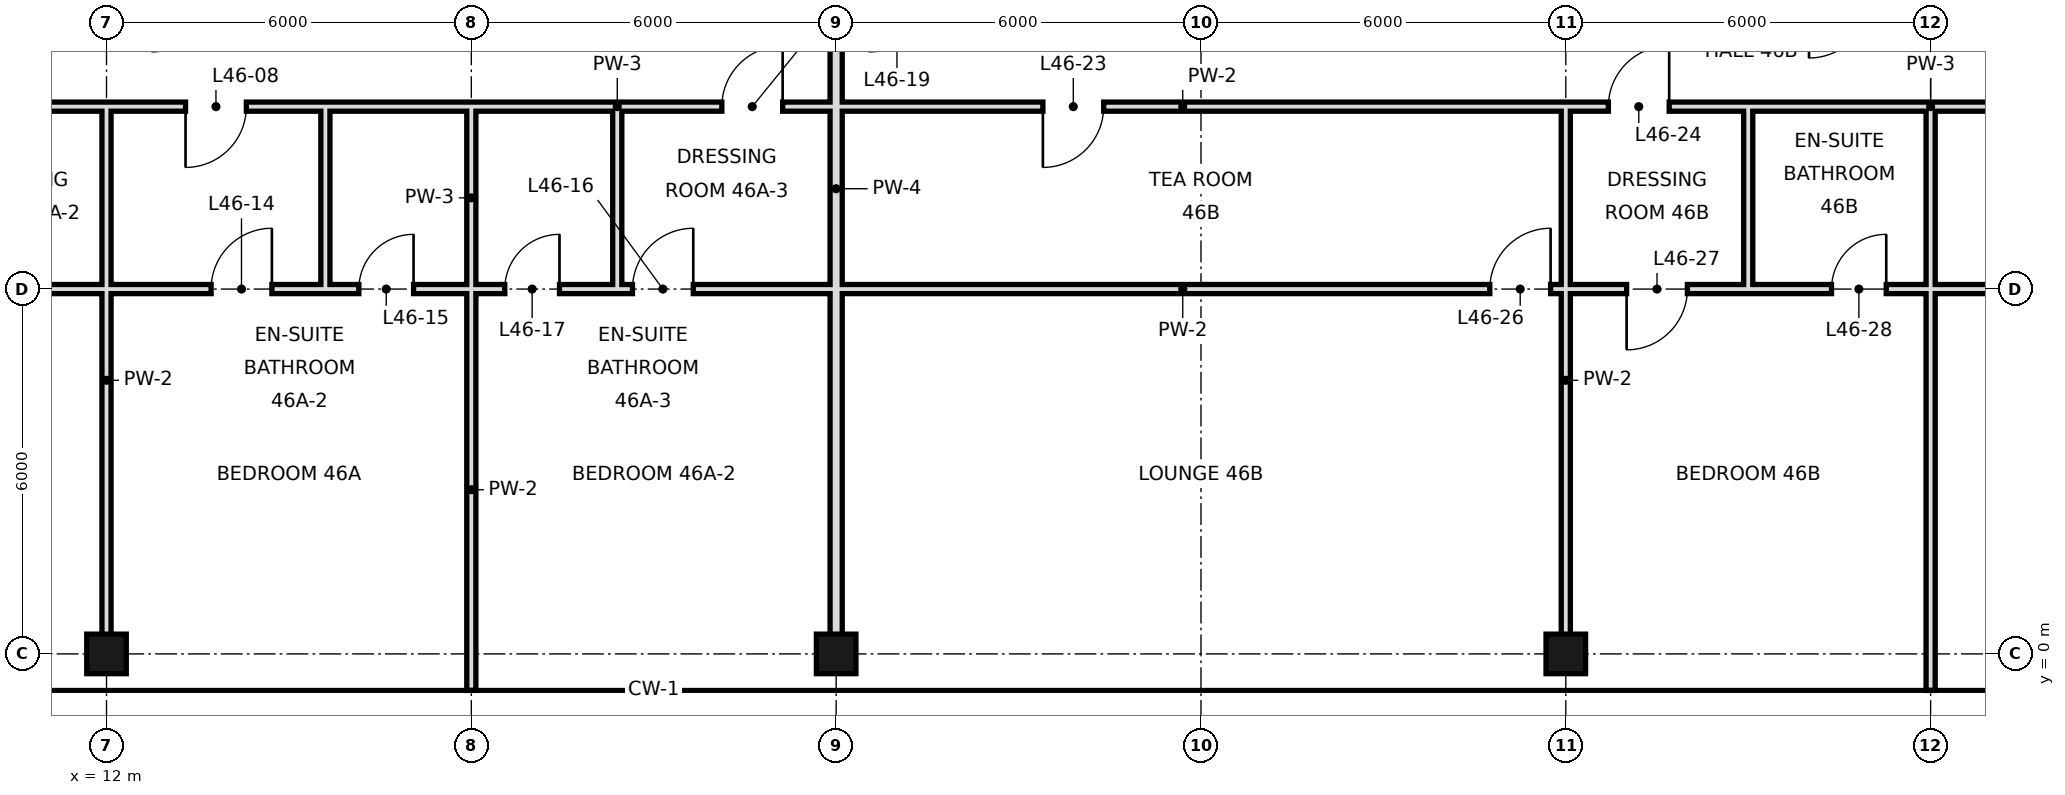
"""IFC4 building model, lengths in metres.
Left out: names, types, materials, properties, quantities, classifications, styles, units other than length and angle.
Written with IfcOpenShell. Run it as: python <this file> out.ifc"""

import sys

from ifc_helpers import new_model, si_unit, direction, frame, frame_2d, origin, origin_2d, place, context, subcontext, project, spatial, rectangle, hollow_rectangle, extrude, element, fill, save


model = new_model("IFC4")
c1 = context("Model", 3, precision=1e-05, world=origin(), true_north=direction((0.0, 1.0)))
c2 = subcontext(c1, "Body", "Model", "MODEL_VIEW")
j1 = project(units=[si_unit("LENGTHUNIT", "METRE"), si_unit("PLANEANGLEUNIT", "RADIAN")], contexts=[c1])
p1 = place(None, origin())
s1 = spatial("IfcSite", under=j1, at=p1, CompositionType="ELEMENT")
p2 = place(p1, origin())
s2 = spatial("IfcBuilding", under=s1, at=p2, CompositionType="ELEMENT")
p3 = place(p2, frame((0.0, 0.0, 199.2)))
s3 = spatial("IfcBuildingStorey", under=s2, at=p3, CompositionType="ELEMENT", Elevation=199.2)
for number, where, z_axis, x_axis in (
    (1, (12.0, 0.0, 0.0), (0.0, 0.0, 1.0), (1.0, 0.0, 0.0)),
    (2, (24.0, 0.0, 0.0), (0.0, 0.0, 1.0), (1.0, 0.0, 0.0)),
    (3, (36.0, 0.0, 0.0), (0.0, 0.0, 1.0), (1.0, 0.0, 0.0)),
):
    element("IfcColumn", number, at=place(p3, frame(where, z_axis=z_axis, x_axis=x_axis)), inside=s3, PredefinedType="COLUMN", context=c2, shape_type="SweptSolid", body=[
        extrude(hollow_rectangle(XDim=0.65, YDim=0.65, WallThickness=0.032, at=origin_2d()), origin(), (0.0, 0.0, 1.0), 3.6),
    ])
p4 = place(p3, frame((12.0, 0.0, 0.0), z_axis=(0.0, 0.0, 1.0), x_axis=(0.0, 1.0, 0.0)))
e4 = element("IfcWall", 4, at=p4, inside=s3, PredefinedType="PARTITIONING", context=c2, shape_type="SweptSolid", body=[
    extrude(rectangle(XDim=9.0, YDim=0.15, at=frame_2d((4.5, 0.0))), origin(), (0.0, 0.0, 1.0), 2.72),
])
p5 = place(p3, frame((15.6, 6.0, 0.0), z_axis=(0.0, 0.0, 1.0), x_axis=(0.0, 1.0, 0.0)))
e5 = element("IfcWall", 5, at=p5, inside=s3, PredefinedType="PARTITIONING", context=c2, shape_type="SweptSolid", body=[
    extrude(rectangle(XDim=3.0, YDim=0.15, at=frame_2d((1.5, 0.0))), origin(), (0.0, 0.0, 1.0), 3.42),
])
p6 = place(p3, frame((18.0, -0.6, 0.0), z_axis=(0.0, 0.0, 1.0), x_axis=(0.0, 1.0, 0.0)))
e6 = element("IfcWall", 6, at=p6, inside=s3, PredefinedType="PARTITIONING", context=c2, shape_type="SweptSolid", body=[
    extrude(rectangle(XDim=6.6, YDim=0.15, at=frame_2d((3.3, 0.0))), origin(), (0.0, 0.0, 1.0), 2.72),
])
p7 = place(p3, frame((18.0, 6.0, 0.0), z_axis=(0.0, 0.0, 1.0), x_axis=(0.0, 1.0, 0.0)))
e7 = element("IfcWall", 7, at=p7, inside=s3, PredefinedType="PARTITIONING", context=c2, shape_type="SweptSolid", body=[
    extrude(rectangle(XDim=3.0, YDim=0.15, at=frame_2d((1.5, 0.0))), origin(), (0.0, 0.0, 1.0), 2.72),
])
p8 = place(p3, frame((20.4, 6.0, 0.0), z_axis=(0.0, 0.0, 1.0), x_axis=(0.0, 1.0, 0.0)))
e8 = element("IfcWall", 8, at=p8, inside=s3, PredefinedType="PARTITIONING", context=c2, shape_type="SweptSolid", body=[
    extrude(rectangle(XDim=3.0, YDim=0.15, at=frame_2d((1.5, 0.0))), origin(), (0.0, 0.0, 1.0), 3.42),
])
p9 = place(p3, frame((24.0, 0.0, 0.0), z_axis=(0.0, 0.0, 1.0), x_axis=(0.0, 1.0, 0.0)))
e9 = element("IfcWall", 9, at=p9, inside=s3, PredefinedType="SOLIDWALL", context=c2, shape_type="SweptSolid", body=[
    extrude(rectangle(XDim=15.3, YDim=0.2, at=frame_2d((7.65, 0.0))), origin(), (0.0, 0.0, 1.0), 2.72),
])
p10 = place(p3, frame((36.0, 0.0, 0.0), z_axis=(0.0, 0.0, 1.0), x_axis=(0.0, 1.0, 0.0)))
e10 = element("IfcWall", 10, at=p10, inside=s3, PredefinedType="PARTITIONING", context=c2, shape_type="SweptSolid", body=[
    extrude(rectangle(XDim=9.0, YDim=0.15, at=frame_2d((4.5, 0.0))), origin(), (0.0, 0.0, 1.0), 2.72),
])
p11 = place(p3, frame((39.0, 6.0, 0.0), z_axis=(0.0, 0.0, 1.0), x_axis=(0.0, 1.0, 0.0)))
e11 = element("IfcWall", 11, at=p11, inside=s3, PredefinedType="PARTITIONING", context=c2, shape_type="SweptSolid", body=[
    extrude(rectangle(XDim=3.0, YDim=0.15, at=frame_2d((1.5, 0.0))), origin(), (0.0, 0.0, 1.0), 3.42),
])
p12 = place(p3, frame((42.0, -0.6, 0.0), z_axis=(0.0, 0.0, 1.0), x_axis=(0.0, 1.0, 0.0)))
e12 = element("IfcWall", 12, at=p12, inside=s3, PredefinedType="PARTITIONING", context=c2, shape_type="SweptSolid", body=[
    extrude(rectangle(XDim=6.6, YDim=0.15, at=frame_2d((3.3, 0.0))), origin(), (0.0, 0.0, 1.0), 2.72),
])
p13 = place(p3, frame((42.0, 6.0, 0.0), z_axis=(0.0, 0.0, 1.0), x_axis=(0.0, 1.0, 0.0)))
e13 = element("IfcWall", 13, at=p13, inside=s3, PredefinedType="PARTITIONING", context=c2, shape_type="SweptSolid", body=[
    extrude(rectangle(XDim=3.0, YDim=0.15, at=frame_2d((1.5, 0.0))), origin(), (0.0, 0.0, 1.0), 2.72),
])
p14 = place(p3, frame((-3.6, 6.0, 0.0), z_axis=(0.0, 0.0, 1.0), x_axis=(1.0, 0.0, 0.0)))
e14 = element("IfcWall", 14, at=p14, inside=s3, PredefinedType="PARTITIONING", context=c2, shape_type="SweptSolid", body=[
    extrude(rectangle(XDim=19.2, YDim=0.15, at=frame_2d((9.6, 0.0))), origin(), (0.0, 0.0, 1.0), 2.72),
])
p15 = place(p14, frame((1.3, 0.0, 0.0)))
e15 = element("IfcOpeningElement", 15, at=p15, cuts=e14, PredefinedType="OPENING", context=c2, shape_type="SweptSolid", body=[
    extrude(rectangle(XDim=1.0, YDim=2.4, at=frame_2d((0.5, 1.2))), frame((0.0, 0.085, 0.0), z_axis=(0.0, -1.0, 0.0), x_axis=(1.0, 0.0, 0.0)), (0.0, 0.0, 1.0), 0.17),
])
p16 = place(p14, frame((10.64, 0.0, 0.0)))
e16 = element("IfcOpeningElement", 16, at=p16, cuts=e14, PredefinedType="OPENING", context=c2, shape_type="SweptSolid", body=[
    extrude(rectangle(XDim=1.8, YDim=2.4, at=frame_2d((0.9, 1.2))), frame((0.0, 0.085, 0.0), z_axis=(0.0, -1.0, 0.0), x_axis=(1.0, 0.0, 0.0)), (0.0, 0.0, 1.0), 0.17),
])
p17 = place(p14, frame((17.32, 0.0, 0.0)))
e17 = element("IfcOpeningElement", 17, at=p17, cuts=e14, PredefinedType="OPENING", context=c2, shape_type="SweptSolid", body=[
    extrude(rectangle(XDim=1.0, YDim=2.4, at=frame_2d((0.5, 1.2))), frame((0.0, 0.085, 0.0), z_axis=(0.0, -1.0, 0.0), x_axis=(1.0, 0.0, 0.0)), (0.0, 0.0, 1.0), 0.17),
])
p18 = place(p3, frame((20.4, 6.0, 0.0), z_axis=(0.0, 0.0, 1.0), x_axis=(1.0, 0.0, 0.0)))
e18 = element("IfcWall", 18, at=p18, inside=s3, PredefinedType="PARTITIONING", context=c2, shape_type="SweptSolid", body=[
    extrude(rectangle(XDim=18.6, YDim=0.15, at=frame_2d((9.3, 0.0))), origin(), (0.0, 0.0, 1.0), 2.97),
])
p19 = place(p18, frame((0.25, 0.0, 0.0)))
e19 = element("IfcOpeningElement", 19, at=p19, cuts=e18, PredefinedType="OPENING", context=c2, shape_type="SweptSolid", body=[
    extrude(rectangle(XDim=1.0, YDim=2.4, at=frame_2d((0.5, 1.2))), frame((0.0, 0.085, 0.0), z_axis=(0.0, -1.0, 0.0), x_axis=(1.0, 0.0, 0.0)), (0.0, 0.0, 1.0), 0.17),
])
p20 = place(p18, frame((14.35, 0.0, 0.0)))
e20 = element("IfcOpeningElement", 20, at=p20, cuts=e18, PredefinedType="OPENING", context=c2, shape_type="SweptSolid", body=[
    extrude(rectangle(XDim=1.0, YDim=2.4, at=frame_2d((0.5, 1.2))), frame((0.0, 0.085, 0.0), z_axis=(0.0, -1.0, 0.0), x_axis=(1.0, 0.0, 0.0)), (0.0, 0.0, 1.0), 0.17),
])
p21 = place(p18, frame((16.6, 0.0, 0.0)))
e21 = element("IfcOpeningElement", 21, at=p21, cuts=e18, PredefinedType="OPENING", context=c2, shape_type="SweptSolid", body=[
    extrude(rectangle(XDim=1.0, YDim=2.4, at=frame_2d((0.5, 1.2))), frame((0.0, 0.085, 0.0), z_axis=(0.0, -1.0, 0.0), x_axis=(1.0, 0.0, 0.0)), (0.0, 0.0, 1.0), 0.17),
])
p22 = place(p3, frame((42.0, 6.0, 0.0), z_axis=(0.0, 0.0, 1.0), x_axis=(1.0, 0.0, 0.0)))
e22 = element("IfcWall", 22, at=p22, inside=s3, PredefinedType="PARTITIONING", context=c2, shape_type="SweptSolid", body=[
    extrude(rectangle(XDim=12.0, YDim=0.15, at=frame_2d((6.0, 0.0))), origin(), (0.0, 0.0, 1.0), 2.97),
])
p23 = place(p22, frame((5.1, 0.0, 0.0)))
e23 = element("IfcOpeningElement", 23, at=p23, cuts=e22, PredefinedType="OPENING", context=c2, shape_type="SweptSolid", body=[
    extrude(rectangle(XDim=1.8, YDim=2.4, at=frame_2d((0.9, 1.2))), frame((0.0, 0.085, 0.0), z_axis=(0.0, -1.0, 0.0), x_axis=(1.0, 0.0, 0.0)), (0.0, 0.0, 1.0), 0.17),
])
p24 = place(p3, frame((15.6, 6.0, 0.0), z_axis=(0.0, 0.0, 1.0), x_axis=(1.0, 0.0, 0.0)))
e24 = element("IfcWall", 24, at=p24, inside=s3, PredefinedType="PARTITIONING", context=c2, shape_type="SweptSolid", body=[
    extrude(rectangle(XDim=4.8, YDim=0.15, at=frame_2d((2.4, 0.0))), origin(), (0.0, 0.0, 1.0), 2.97),
])
p25 = place(p24, frame((0.55, 0.0, 0.0)))
e25 = element("IfcOpeningElement", 25, at=p25, cuts=e24, PredefinedType="OPENING", context=c2, shape_type="SweptSolid", body=[
    extrude(rectangle(XDim=0.9, YDim=2.4, at=frame_2d((0.45, 1.2))), frame((0.0, 0.085, 0.0), z_axis=(0.0, -1.0, 0.0), x_axis=(1.0, 0.0, 0.0)), (0.0, 0.0, 1.0), 0.17),
])
p26 = place(p24, frame((2.95, 0.0, 0.0)))
e26 = element("IfcOpeningElement", 26, at=p26, cuts=e24, PredefinedType="OPENING", context=c2, shape_type="SweptSolid", body=[
    extrude(rectangle(XDim=0.9, YDim=2.4, at=frame_2d((0.45, 1.2))), frame((0.0, 0.085, 0.0), z_axis=(0.0, -1.0, 0.0), x_axis=(1.0, 0.0, 0.0)), (0.0, 0.0, 1.0), 0.17),
])
p27 = place(p3, frame((39.0, 6.0, 0.0), z_axis=(0.0, 0.0, 1.0), x_axis=(1.0, 0.0, 0.0)))
e27 = element("IfcWall", 27, at=p27, inside=s3, PredefinedType="PARTITIONING", context=c2, shape_type="SweptSolid", body=[
    extrude(rectangle(XDim=3.0, YDim=0.15, at=frame_2d((1.5, 0.0))), origin(), (0.0, 0.0, 1.0), 2.97),
])
p28 = place(p27, frame((1.37, 0.0, 0.0)))
e28 = element("IfcOpeningElement", 28, at=p28, cuts=e27, PredefinedType="OPENING", context=c2, shape_type="SweptSolid", body=[
    extrude(rectangle(XDim=0.9, YDim=2.4, at=frame_2d((0.45, 1.2))), frame((0.0, 0.085, 0.0), z_axis=(0.0, -1.0, 0.0), x_axis=(1.0, 0.0, 0.0)), (0.0, 0.0, 1.0), 0.17),
])
p29 = place(p3, frame((-3.6, 9.0, 0.0), z_axis=(0.0, 0.0, 1.0), x_axis=(1.0, 0.0, 0.0)))
e29 = element("IfcWall", 29, at=p29, inside=s3, PredefinedType="PARTITIONING", context=c2, shape_type="SweptSolid", body=[
    extrude(rectangle(XDim=19.2, YDim=0.15, at=frame_2d((9.6, 0.0))), origin(), (0.0, 0.0, 1.0), 3.42),
])
p30 = place(p29, frame((0.88, 0.0, 0.0)))
e30 = element("IfcOpeningElement", 30, at=p30, cuts=e29, PredefinedType="OPENING", context=c2, shape_type="SweptSolid", body=[
    extrude(rectangle(XDim=1.0, YDim=2.4, at=frame_2d((0.5, 1.2))), frame((0.0, 0.085, 0.0), z_axis=(0.0, -1.0, 0.0), x_axis=(1.0, 0.0, 0.0)), (0.0, 0.0, 1.0), 0.17),
])
p31 = place(p29, frame((8.7, 0.0, 0.0)))
e31 = element("IfcOpeningElement", 31, at=p31, cuts=e29, PredefinedType="OPENING", context=c2, shape_type="SweptSolid", body=[
    extrude(rectangle(XDim=1.8, YDim=2.4, at=frame_2d((0.9, 1.2))), frame((0.0, 0.085, 0.0), z_axis=(0.0, -1.0, 0.0), x_axis=(1.0, 0.0, 0.0)), (0.0, 0.0, 1.0), 0.17),
])
p32 = place(p29, frame((16.9, 0.0, 0.0)))
e32 = element("IfcOpeningElement", 32, at=p32, cuts=e29, PredefinedType="OPENING", context=c2, shape_type="SweptSolid", body=[
    extrude(rectangle(XDim=1.0, YDim=2.4, at=frame_2d((0.5, 1.2))), frame((0.0, 0.085, 0.0), z_axis=(0.0, -1.0, 0.0), x_axis=(1.0, 0.0, 0.0)), (0.0, 0.0, 1.0), 0.17),
])
p33 = place(p3, frame((20.4, 9.0, 0.0), z_axis=(0.0, 0.0, 1.0), x_axis=(1.0, 0.0, 0.0)))
e33 = element("IfcWall", 33, at=p33, inside=s3, PredefinedType="PARTITIONING", context=c2, shape_type="SweptSolid", body=[
    extrude(rectangle(XDim=18.6, YDim=0.15, at=frame_2d((9.3, 0.0))), origin(), (0.0, 0.0, 1.0), 3.42),
])
p34 = place(p33, frame((1.72, 0.0, 0.0)))
e34 = element("IfcOpeningElement", 34, at=p34, cuts=e33, PredefinedType="OPENING", context=c2, shape_type="SweptSolid", body=[
    extrude(rectangle(XDim=1.0, YDim=2.4, at=frame_2d((0.5, 1.2))), frame((0.0, 0.085, 0.0), z_axis=(0.0, -1.0, 0.0), x_axis=(1.0, 0.0, 0.0)), (0.0, 0.0, 1.0), 0.17),
])
p35 = place(p33, frame((7.0, 0.0, 0.0)))
e35 = element("IfcOpeningElement", 35, at=p35, cuts=e33, PredefinedType="OPENING", context=c2, shape_type="SweptSolid", body=[
    extrude(rectangle(XDim=1.0, YDim=2.4, at=frame_2d((0.5, 1.2))), frame((0.0, 0.085, 0.0), z_axis=(0.0, -1.0, 0.0), x_axis=(1.0, 0.0, 0.0)), (0.0, 0.0, 1.0), 0.17),
])
p36 = place(p33, frame((16.3, 0.0, 0.0)))
e36 = element("IfcOpeningElement", 36, at=p36, cuts=e33, PredefinedType="OPENING", context=c2, shape_type="SweptSolid", body=[
    extrude(rectangle(XDim=1.0, YDim=2.4, at=frame_2d((0.5, 1.2))), frame((0.0, 0.085, 0.0), z_axis=(0.0, -1.0, 0.0), x_axis=(1.0, 0.0, 0.0)), (0.0, 0.0, 1.0), 0.17),
])
p37 = place(p3, frame((42.0, 9.0, 0.0), z_axis=(0.0, 0.0, 1.0), x_axis=(1.0, 0.0, 0.0)))
e37 = element("IfcWall", 37, at=p37, inside=s3, PredefinedType="PARTITIONING", context=c2, shape_type="SweptSolid", body=[
    extrude(rectangle(XDim=12.6, YDim=0.15, at=frame_2d((6.3, 0.0))), origin(), (0.0, 0.0, 1.0), 3.42),
])
p38 = place(p37, frame((5.1, 0.0, 0.0)))
e38 = element("IfcOpeningElement", 38, at=p38, cuts=e37, PredefinedType="OPENING", context=c2, shape_type="SweptSolid", body=[
    extrude(rectangle(XDim=1.8, YDim=2.4, at=frame_2d((0.9, 1.2))), frame((0.0, 0.085, 0.0), z_axis=(0.0, -1.0, 0.0), x_axis=(1.0, 0.0, 0.0)), (0.0, 0.0, 1.0), 0.17),
])
p39 = place(p3, frame((15.6, 9.0, 0.0), z_axis=(0.0, 0.0, 1.0), x_axis=(1.0, 0.0, 0.0)))
e39 = element("IfcWall", 39, at=p39, inside=s3, PredefinedType="PARTITIONING", context=c2, shape_type="SweptSolid", body=[
    extrude(rectangle(XDim=4.8, YDim=0.15, at=frame_2d((2.4, 0.0))), origin(), (0.0, 0.0, 1.0), 3.42),
])
p40 = place(p3, frame((39.0, 9.0, 0.0), z_axis=(0.0, 0.0, 1.0), x_axis=(1.0, 0.0, 0.0)))
e40 = element("IfcWall", 40, at=p40, inside=s3, PredefinedType="PARTITIONING", context=c2, shape_type="SweptSolid", body=[
    extrude(rectangle(XDim=3.0, YDim=0.15, at=frame_2d((1.5, 0.0))), origin(), (0.0, 0.0, 1.0), 3.42),
])
p41 = place(p32, frame((1.0, 0.0, 0.0), z_axis=(0.0, 0.0, 1.0), x_axis=(-1.0, 0.0, 0.0)))
e41 = element("IfcDoor", 41, at=p41, inside=s3, OperationType="SINGLE_SWING_RIGHT", PredefinedType="DOOR", context=c2, shape_type="SweptSolid", body=[
    extrude(rectangle(XDim=1.0, YDim=2.4, at=frame_2d((0.5, 1.2))), frame((0.0, 0.025, 0.0), z_axis=(0.0, -1.0, 0.0), x_axis=(1.0, 0.0, 0.0)), (0.0, 0.0, 1.0), 0.05),
])
fill(e32, e41)
p42 = place(p34, frame((1.0, 0.0, 0.0), z_axis=(0.0, 0.0, 1.0), x_axis=(-1.0, 0.0, 0.0)))
e42 = element("IfcDoor", 42, at=p42, inside=s3, OperationType="SINGLE_SWING_LEFT", PredefinedType="DOOR", context=c2, shape_type="SweptSolid", body=[
    extrude(rectangle(XDim=1.0, YDim=2.4, at=frame_2d((0.5, 1.2))), frame((0.0, 0.025, 0.0), z_axis=(0.0, -1.0, 0.0), x_axis=(1.0, 0.0, 0.0)), (0.0, 0.0, 1.0), 0.05),
])
fill(e34, e42)
p43 = place(p17, frame((1.0, 0.0, 0.0), z_axis=(0.0, 0.0, 1.0), x_axis=(-1.0, 0.0, 0.0)))
e43 = element("IfcDoor", 43, at=p43, inside=s3, OperationType="SINGLE_SWING_LEFT", PredefinedType="DOOR", context=c2, shape_type="SweptSolid", body=[
    extrude(rectangle(XDim=1.0, YDim=2.4, at=frame_2d((0.5, 1.2))), frame((0.0, 0.025, 0.0), z_axis=(0.0, -1.0, 0.0), x_axis=(1.0, 0.0, 0.0)), (0.0, 0.0, 1.0), 0.05),
])
fill(e17, e43)
p44 = place(p25, frame((0.9, 0.0, 0.0), z_axis=(0.0, 0.0, 1.0), x_axis=(-1.0, 0.0, 0.0)))
e44 = element("IfcDoor", 44, at=p44, inside=s3, OperationType="SINGLE_SWING_LEFT", PredefinedType="DOOR", context=c2, shape_type="SweptSolid", body=[
    extrude(rectangle(XDim=0.9, YDim=2.4, at=frame_2d((0.45, 1.2))), frame((0.0, 0.025, 0.0), z_axis=(0.0, -1.0, 0.0), x_axis=(1.0, 0.0, 0.0)), (0.0, 0.0, 1.0), 0.05),
])
fill(e25, e44)
p45 = place(p19, frame((1.0, 0.0, 0.0), z_axis=(0.0, 0.0, 1.0), x_axis=(-1.0, 0.0, 0.0)))
e45 = element("IfcDoor", 45, at=p45, inside=s3, OperationType="SINGLE_SWING_LEFT", PredefinedType="DOOR", context=c2, shape_type="SweptSolid", body=[
    extrude(rectangle(XDim=1.0, YDim=2.4, at=frame_2d((0.5, 1.2))), frame((0.0, 0.025, 0.0), z_axis=(0.0, -1.0, 0.0), x_axis=(1.0, 0.0, 0.0)), (0.0, 0.0, 1.0), 0.05),
])
fill(e19, e45)
p46 = place(p26, frame((0.9, 0.0, 0.0), z_axis=(0.0, 0.0, 1.0), x_axis=(-1.0, 0.0, 0.0)))
e46 = element("IfcDoor", 46, at=p46, inside=s3, OperationType="SINGLE_SWING_LEFT", PredefinedType="DOOR", context=c2, shape_type="SweptSolid", body=[
    extrude(rectangle(XDim=0.9, YDim=2.4, at=frame_2d((0.45, 1.2))), frame((0.0, 0.025, 0.0), z_axis=(0.0, -1.0, 0.0), x_axis=(1.0, 0.0, 0.0)), (0.0, 0.0, 1.0), 0.05),
])
fill(e26, e46)
p47 = place(p35, frame((1.0, 0.0, 0.0), z_axis=(0.0, 0.0, 1.0), x_axis=(-1.0, 0.0, 0.0)))
e47 = element("IfcDoor", 47, at=p47, inside=s3, OperationType="SINGLE_SWING_RIGHT", PredefinedType="DOOR", context=c2, shape_type="SweptSolid", body=[
    extrude(rectangle(XDim=1.0, YDim=2.4, at=frame_2d((0.5, 1.2))), frame((0.0, 0.025, 0.0), z_axis=(0.0, -1.0, 0.0), x_axis=(1.0, 0.0, 0.0)), (0.0, 0.0, 1.0), 0.05),
])
fill(e35, e47)
p48 = place(p36, frame((1.0, 0.0, 0.0), z_axis=(0.0, 0.0, 1.0), x_axis=(-1.0, 0.0, 0.0)))
e48 = element("IfcDoor", 48, at=p48, inside=s3, OperationType="SINGLE_SWING_LEFT", PredefinedType="DOOR", context=c2, shape_type="SweptSolid", body=[
    extrude(rectangle(XDim=1.0, YDim=2.4, at=frame_2d((0.5, 1.2))), frame((0.0, 0.025, 0.0), z_axis=(0.0, -1.0, 0.0), x_axis=(1.0, 0.0, 0.0)), (0.0, 0.0, 1.0), 0.05),
])
fill(e36, e48)
p49 = place(p20, frame((1.0, 0.0, 0.0), z_axis=(0.0, 0.0, 1.0), x_axis=(-1.0, 0.0, 0.0)))
e49 = element("IfcDoor", 49, at=p49, inside=s3, OperationType="SINGLE_SWING_LEFT", PredefinedType="DOOR", context=c2, shape_type="SweptSolid", body=[
    extrude(rectangle(XDim=1.0, YDim=2.4, at=frame_2d((0.5, 1.2))), frame((0.0, 0.025, 0.0), z_axis=(0.0, -1.0, 0.0), x_axis=(1.0, 0.0, 0.0)), (0.0, 0.0, 1.0), 0.05),
])
fill(e20, e49)
p50 = place(p21, frame((1.0, 0.0, 0.0), z_axis=(0.0, 0.0, 1.0), x_axis=(-1.0, 0.0, 0.0)))
e50 = element("IfcDoor", 50, at=p50, inside=s3, OperationType="SINGLE_SWING_RIGHT", PredefinedType="DOOR", context=c2, shape_type="SweptSolid", body=[
    extrude(rectangle(XDim=1.0, YDim=2.4, at=frame_2d((0.5, 1.2))), frame((0.0, 0.025, 0.0), z_axis=(0.0, -1.0, 0.0), x_axis=(1.0, 0.0, 0.0)), (0.0, 0.0, 1.0), 0.05),
])
fill(e21, e50)
p51 = place(p28, frame((0.9, 0.0, 0.0), z_axis=(0.0, 0.0, 1.0), x_axis=(-1.0, 0.0, 0.0)))
e51 = element("IfcDoor", 51, at=p51, inside=s3, OperationType="SINGLE_SWING_LEFT", PredefinedType="DOOR", context=c2, shape_type="SweptSolid", body=[
    extrude(rectangle(XDim=0.9, YDim=2.4, at=frame_2d((0.45, 1.2))), frame((0.0, 0.025, 0.0), z_axis=(0.0, -1.0, 0.0), x_axis=(1.0, 0.0, 0.0)), (0.0, 0.0, 1.0), 0.05),
])
fill(e28, e51)
save(model, sys.argv[1])
